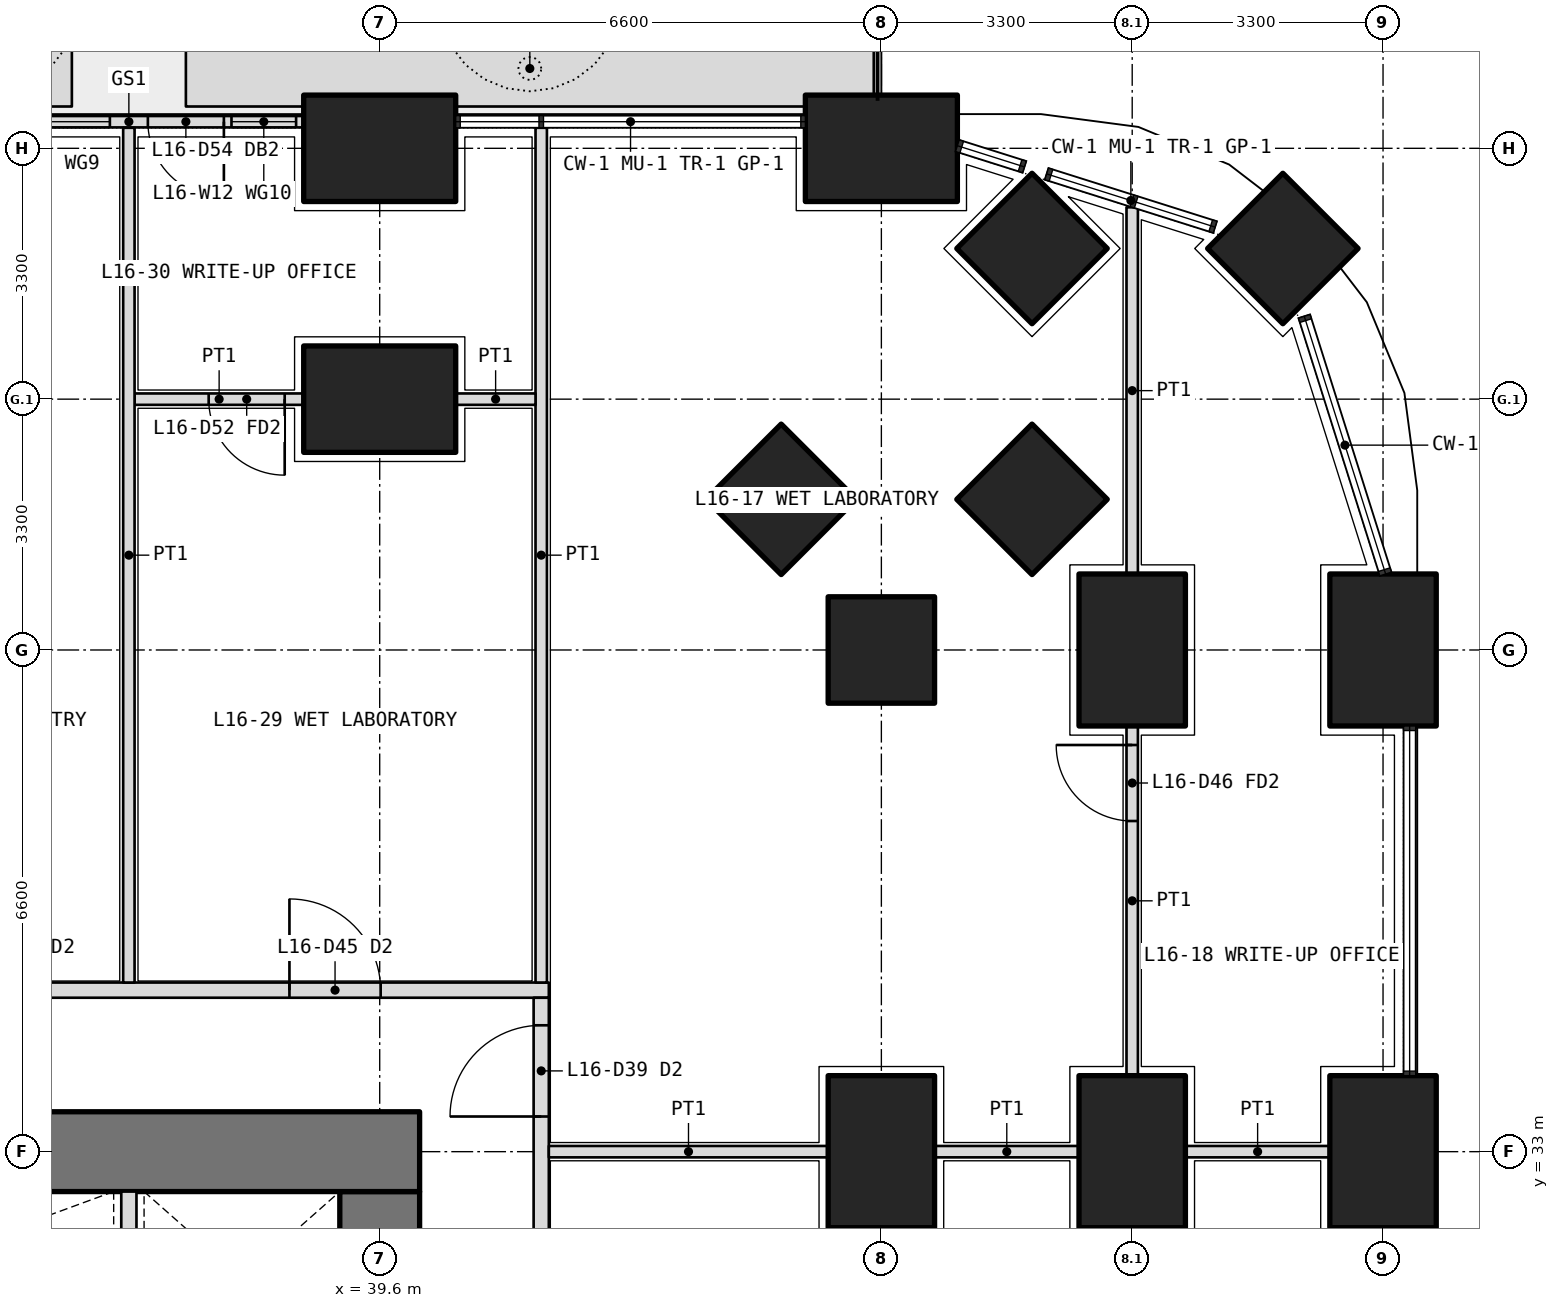
"""IFC4 building model, lengths in metres.
Left out: names, types, materials, properties, quantities, classifications, styles, units other than length and angle.
Written with IfcOpenShell. Run it as: python <this file> out.ifc"""

import sys

from ifc_helpers import new_model, si_unit, direction, frame, frame_2d, origin, origin_2d, place, context, subcontext, project, spatial, polyline, rectangle, outline, extrude, element, fill, save


model = new_model("IFC4")
c1 = context("Model", 3, precision=1e-05, world=origin(), true_north=direction((0.0, 1.0)))
c2 = subcontext(c1, "Body", "Model", "MODEL_VIEW")
j1 = project(units=[si_unit("LENGTHUNIT", "METRE"), si_unit("PLANEANGLEUNIT", "RADIAN")], contexts=[c1])
p1 = place(None, origin())
s1 = spatial("IfcSite", under=j1, at=p1, CompositionType="ELEMENT")
p2 = place(p1, origin())
s2 = spatial("IfcBuilding", under=s1, at=p2, CompositionType="ELEMENT")
p3 = place(p2, frame((0.0, 0.0, 71.7)))
s3 = spatial("IfcBuildingStorey", under=s2, at=p3, CompositionType="ELEMENT", Elevation=71.7)
p4 = place(p3, frame((51.482, 44.882, 0.0), z_axis=(0.0, 0.0, 1.0), x_axis=(0.707106781187, 0.707106781187, 0.0)))
e1 = element("IfcColumn", 1, at=p4, inside=s3, PredefinedType="COLUMN", context=c2, shape_type="SweptSolid", body=[
    extrude(rectangle(XDim=1.4, YDim=1.4, at=origin_2d()), origin(), (0.0, 0.0, 1.0), 4.2),
])
for number, where, z_axis, x_axis in (
    (2, (52.8, 33.0, 0.0), (0.0, 0.0, 1.0), (0.0, 1.0, 0.0)),
    (3, (52.8, 39.6, 0.0), (0.0, 0.0, 1.0), (0.0, 1.0, 0.0)),
    (4, (39.6, 46.2, 0.0), (0.0, 0.0, 1.0), (1.0, 0.0, 0.0)),
    (5, (46.2, 46.2, 0.0), (0.0, 0.0, 1.0), (1.0, 0.0, 0.0)),
):
    element("IfcColumn", number, at=place(p3, frame(where, z_axis=z_axis, x_axis=x_axis)), inside=s3, PredefinedType="COLUMN", context=c2, shape_type="SweptSolid", body=[
        extrude(rectangle(XDim=2.0, YDim=1.4, at=origin_2d()), origin(), (0.0, 0.0, 1.0), 4.2),
    ])
for number, where, z_axis, x_axis in (
    (6, (46.2, 39.6, 0.0), (0.0, 0.0, 1.0), (1.0, 0.0, 0.0)),
    (7, (48.182, 44.882, 0.0), (0.0, 0.0, 1.0), (0.707, 0.707, 0.0)),
):
    element("IfcColumn", number, at=place(p3, frame(where, z_axis=z_axis, x_axis=x_axis)), inside=s3, PredefinedType="COLUMN", context=c2, shape_type="SweptSolid", body=[
        extrude(rectangle(XDim=1.4, YDim=1.4, at=origin_2d()), origin(), (0.0, 0.0, 1.0), 4.2),
    ])
for number, where, z_axis, x_axis in (
    (8, (49.5, 33.0, 0.0), (0.0, 0.0, 1.0), (0.0, 1.0, 0.0)),
    (9, (49.5, 39.6, 0.0), (0.0, 0.0, 1.0), (0.0, 1.0, 0.0)),
):
    element("IfcColumn", number, at=place(p3, frame(where, z_axis=z_axis, x_axis=x_axis)), inside=s3, PredefinedType="COLUMN", context=c2, shape_type="SweptSolid", body=[
        extrude(rectangle(XDim=2.0, YDim=1.4, at=origin_2d()), origin(), (0.0, 0.0, 1.0), 4.2),
    ])
p5 = place(p3, frame((48.182, 41.582, 0.0), z_axis=(0.0, 0.0, 1.0), x_axis=(0.707106781187, 0.707106781187, 0.0)))
e10 = element("IfcColumn", 10, at=p5, inside=s3, PredefinedType="COLUMN", context=c2, shape_type="SweptSolid", body=[
    extrude(rectangle(XDim=1.4, YDim=1.4, at=origin_2d()), origin(), (0.0, 0.0, 1.0), 4.2),
])
p6 = place(p3, frame((39.6, 42.9, 0.0), z_axis=(0.0, 0.0, 1.0), x_axis=(1.0, 0.0, 0.0)))
e11 = element("IfcColumn", 11, at=p6, inside=s3, PredefinedType="COLUMN", context=c2, shape_type="SweptSolid", body=[
    extrude(rectangle(XDim=2.0, YDim=1.4, at=origin_2d()), origin(), (0.0, 0.0, 1.0), 4.2),
])
p7 = place(p3, frame((44.882, 41.582, 0.0), z_axis=(0.0, 0.0, 1.0), x_axis=(0.707106781187, 0.707106781187, 0.0)))
e12 = element("IfcColumn", 12, at=p7, inside=s3, PredefinedType="COLUMN", context=c2, shape_type="SweptSolid", body=[
    extrude(rectangle(XDim=1.4, YDim=1.4, at=origin_2d()), origin(), (0.0, 0.0, 1.0), 4.2),
])
p8 = place(p3, frame((46.2, 33.0, 0.0), z_axis=(0.0, 0.0, 1.0), x_axis=(0.0, 1.0, 0.0)))
e13 = element("IfcColumn", 13, at=p8, inside=s3, PredefinedType="COLUMN", context=c2, shape_type="SweptSolid", body=[
    extrude(rectangle(XDim=2.0, YDim=1.4, at=origin_2d()), origin(), (0.0, 0.0, 1.0), 4.2),
])
p9 = place(p3, origin())
e14 = element("IfcWall", 14, at=p9, inside=s3, PredefinedType="USERDEFINED", context=c2, shape_type="SweptSolid", body=[
    extrude(outline(polyline([(33.1, 46.75), (35.55, 46.75), (35.55, 47.75), (33.1, 47.75), (33.1, 46.75)]), holes=[polyline([(33.25, 46.9), (35.4, 46.9), (35.4, 47.6), (33.25, 47.6), (33.25, 46.9)])]), origin(), (0.0, 0.0, 1.0), 1.05),
])
p10 = place(p3, origin())
e15 = element("IfcWall", 15, at=p10, inside=s3, PredefinedType="USERDEFINED", context=c2, shape_type="SweptSolid", body=[
    extrude(outline(polyline([(37.05, 46.75), (46.1, 46.75), (46.1, 47.75), (37.05, 47.75), (37.05, 46.75)]), holes=[polyline([(37.2, 46.9), (45.95, 46.9), (45.95, 47.6), (37.2, 47.6), (37.2, 46.9)])]), origin(), (0.0, 0.0, 1.0), 1.05),
])
p11 = place(p3, frame((38.6, 46.55, 0.0), z_axis=(0.0, 0.0, 1.0), x_axis=(-1.0, 0.0, 0.0)))
e16 = element("IfcWall", 16, at=p11, inside=s3, PredefinedType="SOLIDWALL", context=c2, shape_type="SweptSolid", body=[
    extrude(rectangle(XDim=4.6, YDim=0.15, at=frame_2d((2.3, 0.0))), origin(), (0.0, 0.0, 1.0), 2.05),
])
p12 = place(p11, frame((1.05, 0.0, 0.0)))
e17 = element("IfcOpeningElement", 17, at=p12, cuts=e16, PredefinedType="OPENING", context=c2, shape_type="SweptSolid", body=[
    extrude(rectangle(XDim=1.0, YDim=2.0, at=frame_2d((0.5, 1.0))), frame((0.0, 0.085, 0.0), z_axis=(0.0, -1.0, 0.0), x_axis=(1.0, 0.0, 0.0)), (0.0, 0.0, 1.0), 0.17),
])
p13 = place(p11, frame((0.1, 0.0, 0.1)))
e18 = element("IfcOpeningElement", 18, at=p13, cuts=e16, PredefinedType="OPENING", context=c2, shape_type="SweptSolid", body=[
    extrude(rectangle(XDim=0.85, YDim=1.65, at=frame_2d((0.425, 0.825))), frame((0.0, 0.085, 0.0), z_axis=(0.0, -1.0, 0.0), x_axis=(1.0, 0.0, 0.0)), (0.0, 0.0, 1.0), 0.17),
])
p14 = place(p11, frame((2.55, 0.0, 0.1)))
e19 = element("IfcOpeningElement", 19, at=p14, cuts=e16, PredefinedType="OPENING", context=c2, shape_type="SweptSolid", body=[
    extrude(rectangle(XDim=1.95, YDim=1.65, at=frame_2d((0.975, 0.825))), frame((0.0, 0.085, 0.0), z_axis=(0.0, -1.0, 0.0), x_axis=(1.0, 0.0, 0.0)), (0.0, 0.0, 1.0), 0.17),
])
p15 = place(p3, frame((39.6, 13.725, 0.0), z_axis=(0.0, 0.0, 1.0), x_axis=(0.0, 1.0, 0.0)))
e20 = element("IfcWall", 20, at=p15, inside=s3, PredefinedType="SHEAR", context=c2, shape_type="SweptSolid", body=[
    extrude(rectangle(XDim=18.75, YDim=1.05, at=frame_2d((9.375, 0.0))), origin(), (0.0, 0.0, 1.0), 4.2),
])
p16 = place(p15, frame((3.025, 0.0, 0.0)))
e21 = element("IfcOpeningElement", 21, at=p16, cuts=e20, PredefinedType="OPENING", context=c2, shape_type="SweptSolid", body=[
    extrude(rectangle(XDim=1.6, YDim=2.1, at=frame_2d((0.8, 1.05))), frame((0.0, 0.535, 0.0), z_axis=(0.0, -1.0, 0.0), x_axis=(1.0, 0.0, 0.0)), (0.0, 0.0, 1.0), 1.07),
])
p17 = place(p15, frame((13.825, 0.0, 0.0)))
e22 = element("IfcOpeningElement", 22, at=p17, cuts=e20, PredefinedType="OPENING", context=c2, shape_type="SweptSolid", body=[
    extrude(rectangle(XDim=1.6, YDim=2.1, at=frame_2d((0.8, 1.05))), frame((0.0, 0.535, 0.0), z_axis=(0.0, -1.0, 0.0), x_axis=(1.0, 0.0, 0.0)), (0.0, 0.0, 1.0), 1.07),
])
p18 = place(p3, frame((40.125, 33.0, 0.0), z_axis=(0.0, 0.0, 1.0), x_axis=(-1.0, 0.0, 0.0)))
e23 = element("IfcWall", 23, at=p18, inside=s3, PredefinedType="SHEAR", context=c2, shape_type="SweptSolid", body=[
    extrude(rectangle(XDim=27.45, YDim=1.05, at=frame_2d((13.725, 0.0))), origin(), (0.0, 0.0, 1.0), 4.2),
])
p19 = place(p3, frame((36.3, 30.2, 0.0), z_axis=(0.0, 0.0, 1.0), x_axis=(0.0, 1.0, 0.0)))
e24 = element("IfcWall", 24, at=p19, inside=s3, PredefinedType="PARTITIONING", context=c2, shape_type="SweptSolid", body=[
    extrude(rectangle(XDim=2.275, YDim=0.2, at=frame_2d((1.138, 0.0))), origin(), (0.0, 0.0, 1.0), 4.2),
])
p20 = place(p3, frame((23.1, 35.125, 0.0), z_axis=(0.0, 0.0, 1.0), x_axis=(1.0, 0.0, 0.0)))
e25 = element("IfcWall", 25, at=p20, inside=s3, PredefinedType="PARTITIONING", context=c2, shape_type="SweptSolid", body=[
    extrude(rectangle(XDim=18.725, YDim=0.2, at=frame_2d((9.362, 0.0))), origin(), (0.0, 0.0, 1.0), 2.55),
])
p21 = place(p20, frame((2.7, 0.0, 0.0)))
e26 = element("IfcOpeningElement", 26, at=p21, cuts=e25, PredefinedType="OPENING", context=c2, shape_type="SweptSolid", body=[
    extrude(rectangle(XDim=1.2, YDim=2.1, at=frame_2d((0.6, 1.05))), frame((0.0, 0.11, 0.0), z_axis=(0.0, -1.0, 0.0), x_axis=(1.0, 0.0, 0.0)), (0.0, 0.0, 1.0), 0.22),
])
p22 = place(p20, frame((7.85, 0.0, 0.0)))
e27 = element("IfcOpeningElement", 27, at=p22, cuts=e25, PredefinedType="OPENING", context=c2, shape_type="SweptSolid", body=[
    extrude(rectangle(XDim=1.0, YDim=2.1, at=frame_2d((0.5, 1.05))), frame((0.0, 0.11, 0.0), z_axis=(0.0, -1.0, 0.0), x_axis=(1.0, 0.0, 0.0)), (0.0, 0.0, 1.0), 0.22),
])
p23 = place(p20, frame((11.15, 0.0, 0.0)))
e28 = element("IfcOpeningElement", 28, at=p23, cuts=e25, PredefinedType="OPENING", context=c2, shape_type="SweptSolid", body=[
    extrude(rectangle(XDim=1.0, YDim=2.1, at=frame_2d((0.5, 1.05))), frame((0.0, 0.11, 0.0), z_axis=(0.0, -1.0, 0.0), x_axis=(1.0, 0.0, 0.0)), (0.0, 0.0, 1.0), 0.22),
])
p24 = place(p20, frame((15.312, 0.0, 0.0)))
e29 = element("IfcOpeningElement", 29, at=p24, cuts=e25, PredefinedType="OPENING", context=c2, shape_type="SweptSolid", body=[
    extrude(rectangle(XDim=1.2, YDim=2.1, at=frame_2d((0.6, 1.05))), frame((0.0, 0.11, 0.0), z_axis=(0.0, -1.0, 0.0), x_axis=(1.0, 0.0, 0.0)), (0.0, 0.0, 1.0), 0.22),
])
p25 = place(p3, frame((41.725, 11.175, 0.0), z_axis=(0.0, 0.0, 1.0), x_axis=(0.0, 1.0, 0.0)))
e30 = element("IfcWall", 30, at=p25, inside=s3, PredefinedType="PARTITIONING", context=c2, shape_type="SweptSolid", body=[
    extrude(rectangle(XDim=23.85, YDim=0.2, at=frame_2d((11.925, 0.0))), origin(), (0.0, 0.0, 1.0), 2.55),
])
p26 = place(p25, frame((3.762, 0.0, 0.0)))
e31 = element("IfcOpeningElement", 31, at=p26, cuts=e30, PredefinedType="OPENING", context=c2, shape_type="SweptSolid", body=[
    extrude(rectangle(XDim=1.0, YDim=2.1, at=frame_2d((0.5, 1.05))), frame((0.0, 0.11, 0.0), z_axis=(0.0, -1.0, 0.0), x_axis=(1.0, 0.0, 0.0)), (0.0, 0.0, 1.0), 0.22),
])
p27 = place(p25, frame((9.625, 0.0, 0.0)))
e32 = element("IfcOpeningElement", 32, at=p27, cuts=e30, PredefinedType="OPENING", context=c2, shape_type="SweptSolid", body=[
    extrude(rectangle(XDim=1.0, YDim=2.1, at=frame_2d((0.5, 1.05))), frame((0.0, 0.11, 0.0), z_axis=(0.0, -1.0, 0.0), x_axis=(1.0, 0.0, 0.0)), (0.0, 0.0, 1.0), 0.22),
])
p28 = place(p25, frame((12.975, 0.0, 0.0)))
e33 = element("IfcOpeningElement", 33, at=p28, cuts=e30, PredefinedType="OPENING", context=c2, shape_type="SweptSolid", body=[
    extrude(rectangle(XDim=0.9, YDim=2.1, at=frame_2d((0.45, 1.05))), frame((0.0, 0.11, 0.0), z_axis=(0.0, -1.0, 0.0), x_axis=(1.0, 0.0, 0.0)), (0.0, 0.0, 1.0), 0.22),
])
p29 = place(p25, frame((16.275, 0.0, 0.0)))
e34 = element("IfcOpeningElement", 34, at=p29, cuts=e30, PredefinedType="OPENING", context=c2, shape_type="SweptSolid", body=[
    extrude(rectangle(XDim=1.2, YDim=2.1, at=frame_2d((0.6, 1.05))), frame((0.0, 0.11, 0.0), z_axis=(0.0, -1.0, 0.0), x_axis=(1.0, 0.0, 0.0)), (0.0, 0.0, 1.0), 0.22),
])
p30 = place(p25, frame((19.575, 0.0, 0.0)))
e35 = element("IfcOpeningElement", 35, at=p30, cuts=e30, PredefinedType="OPENING", context=c2, shape_type="SweptSolid", body=[
    extrude(rectangle(XDim=1.2, YDim=2.1, at=frame_2d((0.6, 1.05))), frame((0.0, 0.11, 0.0), z_axis=(0.0, -1.0, 0.0), x_axis=(1.0, 0.0, 0.0)), (0.0, 0.0, 1.0), 0.22),
])
p31 = place(p25, frame((22.288, 0.0, 0.0)))
e36 = element("IfcOpeningElement", 36, at=p31, cuts=e30, PredefinedType="OPENING", context=c2, shape_type="SweptSolid", body=[
    extrude(rectangle(XDim=1.2, YDim=2.1, at=frame_2d((0.6, 1.05))), frame((0.0, 0.11, 0.0), z_axis=(0.0, -1.0, 0.0), x_axis=(1.0, 0.0, 0.0)), (0.0, 0.0, 1.0), 0.22),
])
p32 = place(p3, frame((41.725, 46.47, 0.0), z_axis=(0.0, 0.0, 1.0), x_axis=(0.0, -1.0, 0.0)))
e37 = element("IfcWall", 37, at=p32, inside=s3, PredefinedType="PARTITIONING", context=c2, shape_type="SweptSolid", body=[
    extrude(rectangle(XDim=11.245, YDim=0.15, at=frame_2d((5.623, 0.0))), origin(), (0.0, 0.0, 1.0), 3.85),
])
p33 = place(p3, frame((49.5, 34.0, 0.0), z_axis=(0.0, 0.0, 1.0), x_axis=(0.0, 1.0, 0.0)))
e38 = element("IfcWall", 38, at=p33, inside=s3, PredefinedType="PARTITIONING", context=c2, shape_type="SweptSolid", body=[
    extrude(rectangle(XDim=4.6, YDim=0.15, at=frame_2d((2.3, 0.0))), origin(), (0.0, 0.0, 1.0), 2.55),
])
p34 = place(p33, frame((3.35, 0.0, 0.0)))
e39 = element("IfcOpeningElement", 39, at=p34, cuts=e38, PredefinedType="OPENING", context=c2, shape_type="SweptSolid", body=[
    extrude(rectangle(XDim=1.0, YDim=2.1, at=frame_2d((0.5, 1.05))), frame((0.0, 0.085, 0.0), z_axis=(0.0, -1.0, 0.0), x_axis=(1.0, 0.0, 0.0)), (0.0, 0.0, 1.0), 0.17),
])
p35 = place(p3, frame((49.5, 40.6, 0.0), z_axis=(0.0, 0.0, 1.0), x_axis=(0.0, 1.0, 0.0)))
e40 = element("IfcWall", 40, at=p35, inside=s3, PredefinedType="PARTITIONING", context=c2, shape_type="SweptSolid", body=[
    extrude(rectangle(XDim=4.824, YDim=0.15, at=frame_2d((2.412, 0.0))), origin(), (0.0, 0.0, 1.0), 3.85),
])
for number, where, z_axis, x_axis in (
    (41, (52.1, 33.0, 0.0), (0.0, 0.0, 1.0), (-1.0, 0.0, 0.0)),
    (42, (48.8, 33.0, 0.0), (0.0, 0.0, 1.0), (-1.0, 0.0, 0.0)),
):
    element("IfcWall", number, at=place(p3, frame(where, z_axis=z_axis, x_axis=x_axis)), inside=s3, PredefinedType="PARTITIONING", context=c2, shape_type="SweptSolid", body=[
        extrude(rectangle(XDim=1.9, YDim=0.15, at=frame_2d((0.95, 0.0))), origin(), (0.0, 0.0, 1.0), 2.55),
    ])
p36 = place(p3, frame((45.5, 33.0, 0.0), z_axis=(0.0, 0.0, 1.0), x_axis=(-1.0, 0.0, 0.0)))
e43 = element("IfcWall", 43, at=p36, inside=s3, PredefinedType="PARTITIONING", context=c2, shape_type="SweptSolid", body=[
    extrude(rectangle(XDim=3.675, YDim=0.15, at=frame_2d((1.837, 0.0))), origin(), (0.0, 0.0, 1.0), 2.55),
])
p37 = place(p3, frame((41.65, 42.9, 0.0), z_axis=(0.0, 0.0, 1.0), x_axis=(-1.0, 0.0, 0.0)))
e44 = element("IfcWall", 44, at=p37, inside=s3, PredefinedType="PARTITIONING", context=c2, shape_type="SweptSolid", body=[
    extrude(rectangle(XDim=1.05, YDim=0.15, at=frame_2d((0.525, 0.0))), origin(), (0.0, 0.0, 1.0), 2.55),
])
p38 = place(p3, frame((38.6, 42.9, 0.0), z_axis=(0.0, 0.0, 1.0), x_axis=(-1.0, 0.0, 0.0)))
e45 = element("IfcWall", 45, at=p38, inside=s3, PredefinedType="PARTITIONING", context=c2, shape_type="SweptSolid", body=[
    extrude(rectangle(XDim=2.225, YDim=0.15, at=frame_2d((1.113, 0.0))), origin(), (0.0, 0.0, 1.0), 2.55),
])
p39 = place(p38, frame((0.25, 0.0, 0.0)))
e46 = element("IfcOpeningElement", 46, at=p39, cuts=e45, PredefinedType="OPENING", context=c2, shape_type="SweptSolid", body=[
    extrude(rectangle(XDim=1.0, YDim=2.1, at=frame_2d((0.5, 1.05))), frame((0.0, 0.085, 0.0), z_axis=(0.0, -1.0, 0.0), x_axis=(1.0, 0.0, 0.0)), (0.0, 0.0, 1.0), 0.17),
])
p40 = place(p3, frame((36.3, 46.47, 0.0), z_axis=(0.0, 0.0, 1.0), x_axis=(0.0, -1.0, 0.0)))
e47 = element("IfcWall", 47, at=p40, inside=s3, PredefinedType="PARTITIONING", context=c2, shape_type="SweptSolid", body=[
    extrude(rectangle(XDim=11.245, YDim=0.15, at=frame_2d((5.623, 0.0))), origin(), (0.0, 0.0, 1.0), 3.85),
])
p41 = place(p12, origin())
e48 = element("IfcDoor", 48, at=p41, inside=s3, OperationType="SINGLE_SWING_LEFT", PredefinedType="DOOR", context=c2, shape_type="SweptSolid", body=[
    extrude(rectangle(XDim=1.0, YDim=2.0, at=frame_2d((0.5, 1.0))), frame((0.0, 0.025, 0.0), z_axis=(0.0, -1.0, 0.0), x_axis=(1.0, 0.0, 0.0)), (0.0, 0.0, 1.0), 0.05),
])
fill(e17, e48)
p42 = place(p13, origin())
e49 = element("IfcWindow", 49, at=p42, inside=s3, PartitioningType="SINGLE_PANEL", PredefinedType="WINDOW", context=c2, shape_type="SweptSolid", body=[
    extrude(rectangle(XDim=0.85, YDim=1.65, at=frame_2d((0.425, 0.825))), frame((0.0, 0.03, 0.0), z_axis=(0.0, -1.0, 0.0), x_axis=(1.0, 0.0, 0.0)), (0.0, 0.0, 1.0), 0.06),
])
fill(e18, e49)
p43 = place(p14, origin())
e50 = element("IfcWindow", 50, at=p43, inside=s3, PartitioningType="SINGLE_PANEL", PredefinedType="WINDOW", context=c2, shape_type="SweptSolid", body=[
    extrude(rectangle(XDim=1.95, YDim=1.65, at=frame_2d((0.975, 0.825))), frame((0.0, 0.03, 0.0), z_axis=(0.0, -1.0, 0.0), x_axis=(1.0, 0.0, 0.0)), (0.0, 0.0, 1.0), 0.06),
])
fill(e19, e50)
p44 = place(p31, origin())
e51 = element("IfcDoor", 51, at=p44, inside=s3, OperationType="DOUBLE_DOOR_SINGLE_SWING", PredefinedType="DOOR", context=c2, shape_type="SweptSolid", body=[
    extrude(rectangle(XDim=1.2, YDim=2.1, at=frame_2d((0.6, 1.05))), frame((0.0, 0.025, 0.0), z_axis=(0.0, -1.0, 0.0), x_axis=(1.0, 0.0, 0.0)), (0.0, 0.0, 1.0), 0.05),
])
fill(e36, e51)
p45 = place(p34, origin())
e52 = element("IfcDoor", 52, at=p45, inside=s3, OperationType="SINGLE_SWING_RIGHT", PredefinedType="DOOR", context=c2, shape_type="SweptSolid", body=[
    extrude(rectangle(XDim=1.0, YDim=2.1, at=frame_2d((0.5, 1.05))), frame((0.0, 0.025, 0.0), z_axis=(0.0, -1.0, 0.0), x_axis=(1.0, 0.0, 0.0)), (0.0, 0.0, 1.0), 0.05),
])
fill(e39, e52)
p46 = place(p24, origin())
e53 = element("IfcDoor", 53, at=p46, inside=s3, OperationType="DOUBLE_DOOR_SINGLE_SWING", PredefinedType="DOOR", context=c2, shape_type="SweptSolid", body=[
    extrude(rectangle(XDim=1.2, YDim=2.1, at=frame_2d((0.6, 1.05))), frame((0.0, 0.025, 0.0), z_axis=(0.0, -1.0, 0.0), x_axis=(1.0, 0.0, 0.0)), (0.0, 0.0, 1.0), 0.05),
])
fill(e29, e53)
p47 = place(p39, origin())
e54 = element("IfcDoor", 54, at=p47, inside=s3, OperationType="SINGLE_SWING_LEFT", PredefinedType="DOOR", context=c2, shape_type="SweptSolid", body=[
    extrude(rectangle(XDim=1.0, YDim=2.1, at=frame_2d((0.5, 1.05))), frame((0.0, 0.025, 0.0), z_axis=(0.0, -1.0, 0.0), x_axis=(1.0, 0.0, 0.0)), (0.0, 0.0, 1.0), 0.05),
])
fill(e46, e54)
save(model, sys.argv[1])
